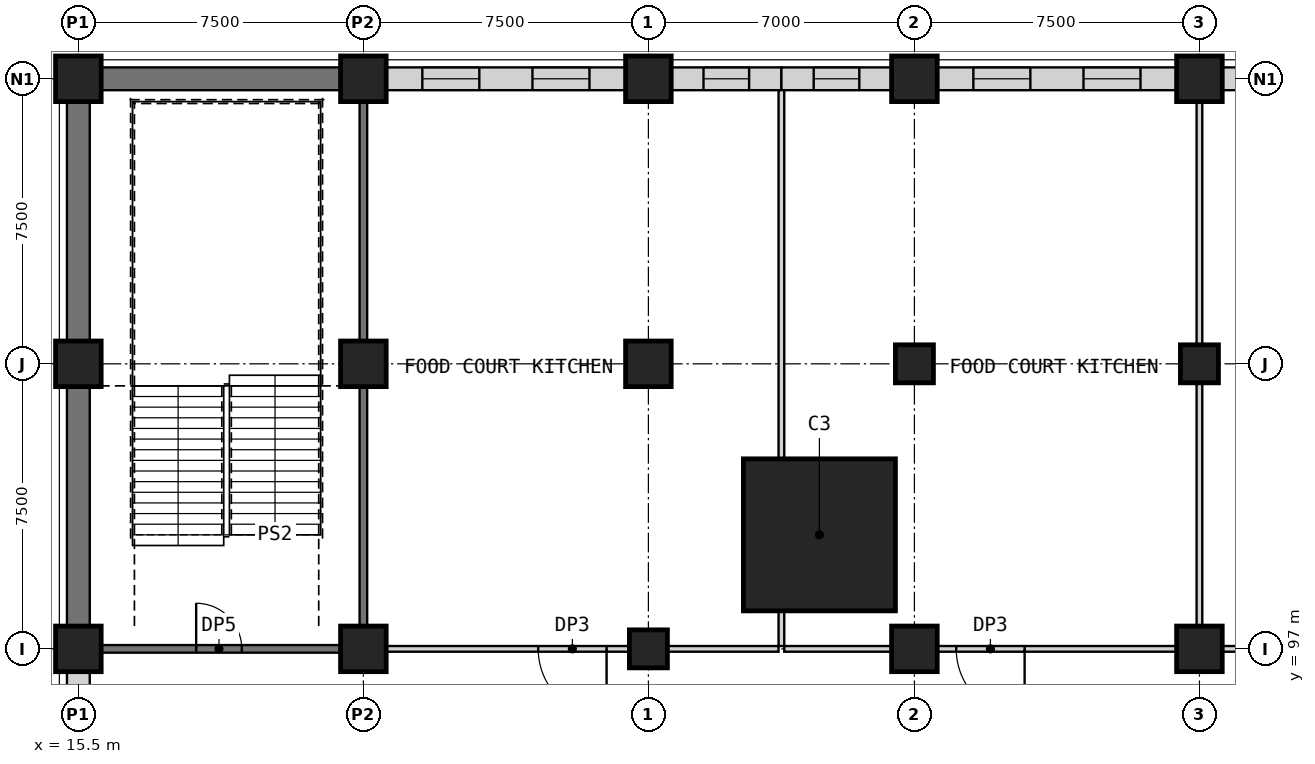
"""IFC4 building model, lengths in metres.
Left out: names, types, materials, properties, quantities, classifications, styles, units other than length and angle.
Written with IfcOpenShell. Run it as: python <this file> out.ifc"""

import sys

from ifc_helpers import new_model, si_unit, direction, frame, frame_2d, origin, origin_2d, place, context, subcontext, project, spatial, rectangle, extrude, element, fill, save


model = new_model("IFC4")
c1 = context("Model", 3, precision=1e-05, world=origin(), true_north=direction((0.0, 1.0)))
c2 = subcontext(c1, "Body", "Model", "MODEL_VIEW")
j1 = project(units=[si_unit("LENGTHUNIT", "METRE"), si_unit("PLANEANGLEUNIT", "RADIAN")], contexts=[c1])
p1 = place(None, origin())
s1 = spatial("IfcSite", under=j1, at=p1, CompositionType="ELEMENT")
p2 = place(p1, origin())
s2 = spatial("IfcBuilding", under=s1, at=p2, CompositionType="ELEMENT")
p3 = place(p2, frame((0.0, 0.0, 18.5)))
s3 = spatial("IfcBuildingStorey", under=s2, at=p3, CompositionType="ELEMENT", Elevation=18.5)
p4 = place(p3, frame((30.5, 97.0, 0.0), z_axis=(0.0, 0.0, 1.0), x_axis=(1.0, 0.0, 0.0)))
e1 = element("IfcColumn", 1, at=p4, inside=s3, PredefinedType="COLUMN", context=c2, shape_type="SweptSolid", body=[
    extrude(rectangle(XDim=1.0, YDim=1.0, at=origin_2d()), origin(), (0.0, 0.0, 1.0), 5.0),
])
p5 = place(p3, frame((37.5, 97.0, 0.0), z_axis=(0.0, 0.0, 1.0), x_axis=(1.0, 0.0, 0.0)))
e2 = element("IfcColumn", 2, at=p5, inside=s3, PredefinedType="COLUMN", context=c2, shape_type="SweptSolid", body=[
    extrude(rectangle(XDim=1.2, YDim=1.2, at=origin_2d()), origin(), (0.0, 0.0, 1.0), 5.0),
])
p6 = place(p3, frame((37.5, 104.5, 0.0), z_axis=(0.0, 0.0, 1.0), x_axis=(1.0, 0.0, 0.0)))
e3 = element("IfcColumn", 3, at=p6, inside=s3, PredefinedType="COLUMN", context=c2, shape_type="SweptSolid", body=[
    extrude(rectangle(XDim=1.0, YDim=1.0, at=origin_2d()), origin(), (0.0, 0.0, 1.0), 5.0),
])
p7 = place(p3, frame((45.0, 97.0, 0.0), z_axis=(0.0, 0.0, 1.0), x_axis=(1.0, 0.0, 0.0)))
e4 = element("IfcColumn", 4, at=p7, inside=s3, PredefinedType="COLUMN", context=c2, shape_type="SweptSolid", body=[
    extrude(rectangle(XDim=1.2, YDim=1.2, at=origin_2d()), origin(), (0.0, 0.0, 1.0), 5.0),
])
p8 = place(p3, frame((45.0, 104.5, 0.0), z_axis=(0.0, 0.0, 1.0), x_axis=(1.0, 0.0, 0.0)))
e5 = element("IfcColumn", 5, at=p8, inside=s3, PredefinedType="COLUMN", context=c2, shape_type="SweptSolid", body=[
    extrude(rectangle(XDim=1.0, YDim=1.0, at=origin_2d()), origin(), (0.0, 0.0, 1.0), 5.0),
])
p9 = place(p3, frame((35.0, 100.0, 0.0), z_axis=(0.0, 0.0, 1.0), x_axis=(1.0, 0.0, 0.0)))
e6 = element("IfcColumn", 6, at=p9, inside=s3, PredefinedType="COLUMN", context=c2, shape_type="SweptSolid", body=[
    extrude(rectangle(XDim=4.0, YDim=4.0, at=origin_2d()), origin(), (0.0, 0.0, 1.0), 5.0),
])
for number, where, z_axis, x_axis in (
    (7, (15.5, 97.0, 0.0), (0.0, 0.0, 1.0), (1.0, 0.0, 0.0)),
    (8, (15.5, 104.5, 0.0), (0.0, 0.0, 1.0), (1.0, 0.0, 0.0)),
    (9, (15.5, 112.0, 0.0), (0.0, 0.0, 1.0), (1.0, 0.0, 0.0)),
    (10, (23.0, 97.0, 0.0), (0.0, 0.0, 1.0), (1.0, 0.0, 0.0)),
    (11, (23.0, 104.5, 0.0), (0.0, 0.0, 1.0), (1.0, 0.0, 0.0)),
    (12, (23.0, 112.0, 0.0), (0.0, 0.0, 1.0), (1.0, 0.0, 0.0)),
    (13, (30.5, 104.5, 0.0), (0.0, 0.0, 1.0), (1.0, 0.0, 0.0)),
    (14, (30.5, 112.0, 0.0), (0.0, 0.0, 1.0), (1.0, 0.0, 0.0)),
    (15, (37.5, 112.0, 0.0), (0.0, 0.0, 1.0), (1.0, 0.0, 0.0)),
    (16, (45.0, 112.0, 0.0), (0.0, 0.0, 1.0), (1.0, 0.0, 0.0)),
):
    element("IfcColumn", number, at=place(p3, frame(where, z_axis=z_axis, x_axis=x_axis)), inside=s3, PredefinedType="COLUMN", context=c2, shape_type="SweptSolid", body=[
        extrude(rectangle(XDim=1.2, YDim=1.2, at=origin_2d()), origin(), (0.0, 0.0, 1.0), 5.0),
    ])
p10 = place(p3, frame((16.1, 97.0, 0.0), z_axis=(0.0, 0.0, 1.0), x_axis=(1.0, 0.0, 0.0)))
e17 = element("IfcWall", 17, at=p10, inside=s3, PredefinedType="SHEAR", context=c2, shape_type="SweptSolid", body=[
    extrude(rectangle(XDim=6.3, YDim=0.2, at=frame_2d((3.15, 0.0))), origin(), (0.0, 0.0, 1.0), 4.7),
])
p11 = place(p10, frame((2.5, 0.0, 0.0)))
e18 = element("IfcOpeningElement", 18, at=p11, cuts=e17, PredefinedType="OPENING", context=c2, shape_type="SweptSolid", body=[
    extrude(rectangle(XDim=1.2, YDim=2.1, at=frame_2d((0.6, 1.05))), frame((0.0, 0.11, 0.0), z_axis=(0.0, -1.0, 0.0), x_axis=(1.0, 0.0, 0.0)), (0.0, 0.0, 1.0), 0.22),
])
p12 = place(p3, frame((30.0, 97.0, 0.0), z_axis=(0.0, 0.0, 1.0), x_axis=(-1.0, 0.0, 0.0)))
e19 = element("IfcWall", 19, at=p12, inside=s3, PredefinedType="PARTITIONING", context=c2, shape_type="SweptSolid", body=[
    extrude(rectangle(XDim=6.4, YDim=0.15, at=frame_2d((3.2, 0.0))), origin(), (0.0, 0.0, 1.0), 4.7),
])
p13 = place(p12, frame((0.6, 0.0, 0.0)))
e20 = element("IfcOpeningElement", 20, at=p13, cuts=e19, PredefinedType="OPENING", context=c2, shape_type="SweptSolid", body=[
    extrude(rectangle(XDim=1.8, YDim=2.4, at=frame_2d((0.9, 1.2))), frame((0.0, 0.085, 0.0), z_axis=(0.0, -1.0, 0.0), x_axis=(1.0, 0.0, 0.0)), (0.0, 0.0, 1.0), 0.17),
])
p14 = place(p3, frame((31.0, 97.0, 0.0), z_axis=(0.0, 0.0, 1.0), x_axis=(1.0, 0.0, 0.0)))
e21 = element("IfcWall", 21, at=p14, inside=s3, PredefinedType="PARTITIONING", context=c2, shape_type="SweptSolid", body=[
    extrude(rectangle(XDim=2.925, YDim=0.15, at=frame_2d((1.462, 0.0))), origin(), (0.0, 0.0, 1.0), 4.7),
])
p15 = place(p3, frame((34.075, 97.0, 0.0), z_axis=(0.0, 0.0, 1.0), x_axis=(1.0, 0.0, 0.0)))
e22 = element("IfcWall", 22, at=p15, inside=s3, PredefinedType="PARTITIONING", context=c2, shape_type="SweptSolid", body=[
    extrude(rectangle(XDim=2.825, YDim=0.15, at=frame_2d((1.413, 0.0))), origin(), (0.0, 0.0, 1.0), 4.7),
])
p16 = place(p3, frame((44.4, 97.0, 0.0), z_axis=(0.0, 0.0, 1.0), x_axis=(-1.0, 0.0, 0.0)))
e23 = element("IfcWall", 23, at=p16, inside=s3, PredefinedType="PARTITIONING", context=c2, shape_type="SweptSolid", body=[
    extrude(rectangle(XDim=6.3, YDim=0.15, at=frame_2d((3.15, 0.0))), origin(), (0.0, 0.0, 1.0), 4.7),
])
p17 = place(p16, frame((4.0, 0.0, 0.0)))
e24 = element("IfcOpeningElement", 24, at=p17, cuts=e23, PredefinedType="OPENING", context=c2, shape_type="SweptSolid", body=[
    extrude(rectangle(XDim=1.8, YDim=2.4, at=frame_2d((0.9, 1.2))), frame((0.0, 0.085, 0.0), z_axis=(0.0, -1.0, 0.0), x_axis=(1.0, 0.0, 0.0)), (0.0, 0.0, 1.0), 0.17),
])
p18 = place(p3, frame((51.9, 97.0, 0.0), z_axis=(0.0, 0.0, 1.0), x_axis=(-1.0, 0.0, 0.0)))
e25 = element("IfcWall", 25, at=p18, inside=s3, PredefinedType="PARTITIONING", context=c2, shape_type="SweptSolid", body=[
    extrude(rectangle(XDim=6.3, YDim=0.15, at=frame_2d((3.15, 0.0))), origin(), (0.0, 0.0, 1.0), 4.7),
])
p19 = place(p18, frame((0.5, 0.0, 0.0)))
e26 = element("IfcOpeningElement", 26, at=p19, cuts=e25, PredefinedType="OPENING", context=c2, shape_type="SweptSolid", body=[
    extrude(rectangle(XDim=1.8, YDim=2.4, at=frame_2d((0.9, 1.2))), frame((0.0, 0.085, 0.0), z_axis=(0.0, -1.0, 0.0), x_axis=(1.0, 0.0, 0.0)), (0.0, 0.0, 1.0), 0.17),
])
p20 = place(p3, frame((16.1, 112.0, 0.0), z_axis=(0.0, 0.0, 1.0), x_axis=(1.0, 0.0, 0.0)))
e27 = element("IfcWall", 27, at=p20, inside=s3, PredefinedType="PARTITIONING", context=c2, shape_type="SweptSolid", body=[
    extrude(rectangle(XDim=6.3, YDim=0.6, at=frame_2d((3.15, 0.0))), origin(), (0.0, 0.0, 1.0), 4.1),
])
p21 = place(p3, frame((23.6, 112.0, 0.0), z_axis=(0.0, 0.0, 1.0), x_axis=(1.0, 0.0, 0.0)))
e28 = element("IfcWall", 28, at=p21, inside=s3, PredefinedType="PARTITIONING", context=c2, shape_type="SweptSolid", body=[
    extrude(rectangle(XDim=6.3, YDim=0.6, at=frame_2d((3.15, 0.0))), origin(), (0.0, 0.0, 1.0), 4.1),
])
p22 = place(p21, frame((0.951, 0.0, 0.9)))
e29 = element("IfcOpeningElement", 29, at=p22, cuts=e28, PredefinedType="OPENING", context=c2, shape_type="SweptSolid", body=[
    extrude(rectangle(XDim=1.5, YDim=2.8, at=frame_2d((0.75, 1.4))), frame((0.0, 0.31, 0.0), z_axis=(0.0, -1.0, 0.0), x_axis=(1.0, 0.0, 0.0)), (0.0, 0.0, 1.0), 0.62),
])
p23 = place(p21, frame((3.849, 0.0, 0.9)))
e30 = element("IfcOpeningElement", 30, at=p23, cuts=e28, PredefinedType="OPENING", context=c2, shape_type="SweptSolid", body=[
    extrude(rectangle(XDim=1.5, YDim=2.8, at=frame_2d((0.75, 1.4))), frame((0.0, 0.31, 0.0), z_axis=(0.0, -1.0, 0.0), x_axis=(1.0, 0.0, 0.0)), (0.0, 0.0, 1.0), 0.62),
])
p24 = place(p3, frame((31.1, 112.0, 0.0), z_axis=(0.0, 0.0, 1.0), x_axis=(1.0, 0.0, 0.0)))
e31 = element("IfcWall", 31, at=p24, inside=s3, PredefinedType="PARTITIONING", context=c2, shape_type="SweptSolid", body=[
    extrude(rectangle(XDim=2.9, YDim=0.6, at=frame_2d((1.45, 0.0))), origin(), (0.0, 0.0, 1.0), 4.1),
])
p25 = place(p24, frame((0.85, 0.0, 0.9)))
e32 = element("IfcOpeningElement", 32, at=p25, cuts=e31, PredefinedType="OPENING", context=c2, shape_type="SweptSolid", body=[
    extrude(rectangle(XDim=1.2, YDim=2.8, at=frame_2d((0.6, 1.4))), frame((0.0, 0.31, 0.0), z_axis=(0.0, -1.0, 0.0), x_axis=(1.0, 0.0, 0.0)), (0.0, 0.0, 1.0), 0.62),
])
p26 = place(p3, frame((34.0, 112.0, 0.0), z_axis=(0.0, 0.0, 1.0), x_axis=(1.0, 0.0, 0.0)))
e33 = element("IfcWall", 33, at=p26, inside=s3, PredefinedType="PARTITIONING", context=c2, shape_type="SweptSolid", body=[
    extrude(rectangle(XDim=2.9, YDim=0.6, at=frame_2d((1.45, 0.0))), origin(), (0.0, 0.0, 1.0), 4.1),
])
p27 = place(p26, frame((0.85, 0.0, 0.9)))
e34 = element("IfcOpeningElement", 34, at=p27, cuts=e33, PredefinedType="OPENING", context=c2, shape_type="SweptSolid", body=[
    extrude(rectangle(XDim=1.2, YDim=2.8, at=frame_2d((0.6, 1.4))), frame((0.0, 0.31, 0.0), z_axis=(0.0, -1.0, 0.0), x_axis=(1.0, 0.0, 0.0)), (0.0, 0.0, 1.0), 0.62),
])
p28 = place(p3, frame((38.1, 112.0, 0.0), z_axis=(0.0, 0.0, 1.0), x_axis=(1.0, 0.0, 0.0)))
e35 = element("IfcWall", 35, at=p28, inside=s3, PredefinedType="PARTITIONING", context=c2, shape_type="SweptSolid", body=[
    extrude(rectangle(XDim=6.3, YDim=0.6, at=frame_2d((3.15, 0.0))), origin(), (0.0, 0.0, 1.0), 4.1),
])
p29 = place(p28, frame((0.951, 0.0, 0.9)))
e36 = element("IfcOpeningElement", 36, at=p29, cuts=e35, PredefinedType="OPENING", context=c2, shape_type="SweptSolid", body=[
    extrude(rectangle(XDim=1.5, YDim=2.8, at=frame_2d((0.75, 1.4))), frame((0.0, 0.31, 0.0), z_axis=(0.0, -1.0, 0.0), x_axis=(1.0, 0.0, 0.0)), (0.0, 0.0, 1.0), 0.62),
])
p30 = place(p28, frame((3.849, 0.0, 0.9)))
e37 = element("IfcOpeningElement", 37, at=p30, cuts=e35, PredefinedType="OPENING", context=c2, shape_type="SweptSolid", body=[
    extrude(rectangle(XDim=1.5, YDim=2.8, at=frame_2d((0.75, 1.4))), frame((0.0, 0.31, 0.0), z_axis=(0.0, -1.0, 0.0), x_axis=(1.0, 0.0, 0.0)), (0.0, 0.0, 1.0), 0.62),
])
p31 = place(p3, frame((45.6, 112.0, 0.0), z_axis=(0.0, 0.0, 1.0), x_axis=(1.0, 0.0, 0.0)))
e38 = element("IfcWall", 38, at=p31, inside=s3, PredefinedType="PARTITIONING", context=c2, shape_type="SweptSolid", body=[
    extrude(rectangle(XDim=6.3, YDim=0.6, at=frame_2d((3.15, 0.0))), origin(), (0.0, 0.0, 1.0), 4.1),
])
p32 = place(p31, frame((0.951, 0.0, 0.9)))
e39 = element("IfcOpeningElement", 39, at=p32, cuts=e38, PredefinedType="OPENING", context=c2, shape_type="SweptSolid", body=[
    extrude(rectangle(XDim=1.5, YDim=2.8, at=frame_2d((0.75, 1.4))), frame((0.0, 0.31, 0.0), z_axis=(0.0, -1.0, 0.0), x_axis=(1.0, 0.0, 0.0)), (0.0, 0.0, 1.0), 0.62),
])
p33 = place(p31, frame((3.849, 0.0, 0.9)))
e40 = element("IfcOpeningElement", 40, at=p33, cuts=e38, PredefinedType="OPENING", context=c2, shape_type="SweptSolid", body=[
    extrude(rectangle(XDim=1.5, YDim=2.8, at=frame_2d((0.75, 1.4))), frame((0.0, 0.31, 0.0), z_axis=(0.0, -1.0, 0.0), x_axis=(1.0, 0.0, 0.0)), (0.0, 0.0, 1.0), 0.62),
])
p34 = place(p3, frame((15.5, 90.6, 0.0), z_axis=(0.0, 0.0, 1.0), x_axis=(0.0, 1.0, 0.0)))
e41 = element("IfcWall", 41, at=p34, inside=s3, PredefinedType="PARTITIONING", context=c2, shape_type="SweptSolid", body=[
    extrude(rectangle(XDim=5.8, YDim=0.6, at=frame_2d((2.9, 0.0))), origin(), (0.0, 0.0, 1.0), 4.1),
])
p35 = place(p34, frame((0.816, 0.0, 0.9)))
e42 = element("IfcOpeningElement", 42, at=p35, cuts=e41, PredefinedType="OPENING", context=c2, shape_type="SweptSolid", body=[
    extrude(rectangle(XDim=1.5, YDim=2.8, at=frame_2d((0.75, 1.4))), frame((0.0, 0.31, 0.0), z_axis=(0.0, -1.0, 0.0), x_axis=(1.0, 0.0, 0.0)), (0.0, 0.0, 1.0), 0.62),
])
p36 = place(p34, frame((3.484, 0.0, 0.9)))
e43 = element("IfcOpeningElement", 43, at=p36, cuts=e41, PredefinedType="OPENING", context=c2, shape_type="SweptSolid", body=[
    extrude(rectangle(XDim=1.5, YDim=2.8, at=frame_2d((0.75, 1.4))), frame((0.0, 0.31, 0.0), z_axis=(0.0, -1.0, 0.0), x_axis=(1.0, 0.0, 0.0)), (0.0, 0.0, 1.0), 0.62),
])
for number, where, z_axis, x_axis in (
    (44, (15.5, 97.6, 0.0), (0.0, 0.0, 1.0), (0.0, 1.0, 0.0)),
    (45, (15.5, 105.1, 0.0), (0.0, 0.0, 1.0), (0.0, 1.0, 0.0)),
):
    element("IfcWall", number, at=place(p3, frame(where, z_axis=z_axis, x_axis=x_axis)), inside=s3, PredefinedType="PARTITIONING", context=c2, shape_type="SweptSolid", body=[
        extrude(rectangle(XDim=6.3, YDim=0.6, at=frame_2d((3.15, 0.0))), origin(), (0.0, 0.0, 1.0), 4.1),
    ])
for number, where, z_axis, x_axis in (
    (46, (23.0, 97.6, 0.0), (0.0, 0.0, 1.0), (0.0, 1.0, 0.0)),
    (47, (23.0, 105.1, 0.0), (0.0, 0.0, 1.0), (0.0, 1.0, 0.0)),
):
    element("IfcWall", number, at=place(p3, frame(where, z_axis=z_axis, x_axis=x_axis)), inside=s3, PredefinedType="SHEAR", context=c2, shape_type="SweptSolid", body=[
        extrude(rectangle(XDim=6.3, YDim=0.2, at=frame_2d((3.15, 0.0))), origin(), (0.0, 0.0, 1.0), 4.7),
    ])
for number, where, z_axis, x_axis in (
    (48, (45.0, 97.6, 0.0), (0.0, 0.0, 1.0), (0.0, 1.0, 0.0)),
    (49, (45.0, 105.0, 0.0), (0.0, 0.0, 1.0), (0.0, 1.0, 0.0)),
):
    element("IfcWall", number, at=place(p3, frame(where, z_axis=z_axis, x_axis=x_axis)), inside=s3, PredefinedType="PARTITIONING", context=c2, shape_type="SweptSolid", body=[
        extrude(rectangle(XDim=6.4, YDim=0.15, at=frame_2d((3.2, 0.0))), origin(), (0.0, 0.0, 1.0), 4.7),
    ])
p37 = place(p3, frame((34.0, 97.075, 0.0), z_axis=(0.0, 0.0, 1.0), x_axis=(0.0, 1.0, 0.0)))
e50 = element("IfcWall", 50, at=p37, inside=s3, PredefinedType="PARTITIONING", context=c2, shape_type="SweptSolid", body=[
    extrude(rectangle(XDim=0.925, YDim=0.15, at=frame_2d((0.462, 0.0))), origin(), (0.0, 0.0, 1.0), 4.7),
])
p38 = place(p3, frame((34.0, 102.0, 0.0), z_axis=(0.0, 0.0, 1.0), x_axis=(0.0, 1.0, 0.0)))
e51 = element("IfcWall", 51, at=p38, inside=s3, PredefinedType="PARTITIONING", context=c2, shape_type="SweptSolid", body=[
    extrude(rectangle(XDim=9.7, YDim=0.15, at=frame_2d((4.85, 0.0))), origin(), (0.0, 0.0, 1.0), 4.7),
])
p39 = place(p11, origin())
e52 = element("IfcDoor", 52, at=p39, inside=s3, OperationType="SINGLE_SWING_LEFT", PredefinedType="DOOR", context=c2, shape_type="SweptSolid", body=[
    extrude(rectangle(XDim=1.2, YDim=2.1, at=frame_2d((0.6, 1.05))), frame((0.0, 0.025, 0.0), z_axis=(0.0, -1.0, 0.0), x_axis=(1.0, 0.0, 0.0)), (0.0, 0.0, 1.0), 0.05),
])
fill(e18, e52)
p40 = place(p13, origin())
e53 = element("IfcDoor", 53, at=p40, inside=s3, OperationType="SINGLE_SWING_LEFT", PredefinedType="DOOR", context=c2, shape_type="SweptSolid", body=[
    extrude(rectangle(XDim=1.8, YDim=2.4, at=frame_2d((0.9, 1.2))), frame((0.0, 0.025, 0.0), z_axis=(0.0, -1.0, 0.0), x_axis=(1.0, 0.0, 0.0)), (0.0, 0.0, 1.0), 0.05),
])
fill(e20, e53)
p41 = place(p17, origin())
e54 = element("IfcDoor", 54, at=p41, inside=s3, OperationType="SINGLE_SWING_LEFT", PredefinedType="DOOR", context=c2, shape_type="SweptSolid", body=[
    extrude(rectangle(XDim=1.8, YDim=2.4, at=frame_2d((0.9, 1.2))), frame((0.0, 0.025, 0.0), z_axis=(0.0, -1.0, 0.0), x_axis=(1.0, 0.0, 0.0)), (0.0, 0.0, 1.0), 0.05),
])
fill(e24, e54)
p42 = place(p22, origin())
e55 = element("IfcWindow", 55, at=p42, inside=s3, PartitioningType="SINGLE_PANEL", PredefinedType="WINDOW", context=c2, shape_type="SweptSolid", body=[
    extrude(rectangle(XDim=1.5, YDim=2.8, at=frame_2d((0.75, 1.4))), frame((0.0, 0.03, 0.0), z_axis=(0.0, -1.0, 0.0), x_axis=(1.0, 0.0, 0.0)), (0.0, 0.0, 1.0), 0.06),
])
fill(e29, e55)
p43 = place(p23, origin())
e56 = element("IfcWindow", 56, at=p43, inside=s3, PartitioningType="SINGLE_PANEL", PredefinedType="WINDOW", context=c2, shape_type="SweptSolid", body=[
    extrude(rectangle(XDim=1.5, YDim=2.8, at=frame_2d((0.75, 1.4))), frame((0.0, 0.03, 0.0), z_axis=(0.0, -1.0, 0.0), x_axis=(1.0, 0.0, 0.0)), (0.0, 0.0, 1.0), 0.06),
])
fill(e30, e56)
p44 = place(p25, origin())
e57 = element("IfcWindow", 57, at=p44, inside=s3, PartitioningType="SINGLE_PANEL", PredefinedType="WINDOW", context=c2, shape_type="SweptSolid", body=[
    extrude(rectangle(XDim=1.2, YDim=2.8, at=frame_2d((0.6, 1.4))), frame((0.0, 0.03, 0.0), z_axis=(0.0, -1.0, 0.0), x_axis=(1.0, 0.0, 0.0)), (0.0, 0.0, 1.0), 0.06),
])
fill(e32, e57)
p45 = place(p27, origin())
e58 = element("IfcWindow", 58, at=p45, inside=s3, PartitioningType="SINGLE_PANEL", PredefinedType="WINDOW", context=c2, shape_type="SweptSolid", body=[
    extrude(rectangle(XDim=1.2, YDim=2.8, at=frame_2d((0.6, 1.4))), frame((0.0, 0.03, 0.0), z_axis=(0.0, -1.0, 0.0), x_axis=(1.0, 0.0, 0.0)), (0.0, 0.0, 1.0), 0.06),
])
fill(e34, e58)
p46 = place(p29, origin())
e59 = element("IfcWindow", 59, at=p46, inside=s3, PartitioningType="SINGLE_PANEL", PredefinedType="WINDOW", context=c2, shape_type="SweptSolid", body=[
    extrude(rectangle(XDim=1.5, YDim=2.8, at=frame_2d((0.75, 1.4))), frame((0.0, 0.03, 0.0), z_axis=(0.0, -1.0, 0.0), x_axis=(1.0, 0.0, 0.0)), (0.0, 0.0, 1.0), 0.06),
])
fill(e36, e59)
p47 = place(p30, origin())
e60 = element("IfcWindow", 60, at=p47, inside=s3, PartitioningType="SINGLE_PANEL", PredefinedType="WINDOW", context=c2, shape_type="SweptSolid", body=[
    extrude(rectangle(XDim=1.5, YDim=2.8, at=frame_2d((0.75, 1.4))), frame((0.0, 0.03, 0.0), z_axis=(0.0, -1.0, 0.0), x_axis=(1.0, 0.0, 0.0)), (0.0, 0.0, 1.0), 0.06),
])
fill(e37, e60)
save(model, sys.argv[1])
